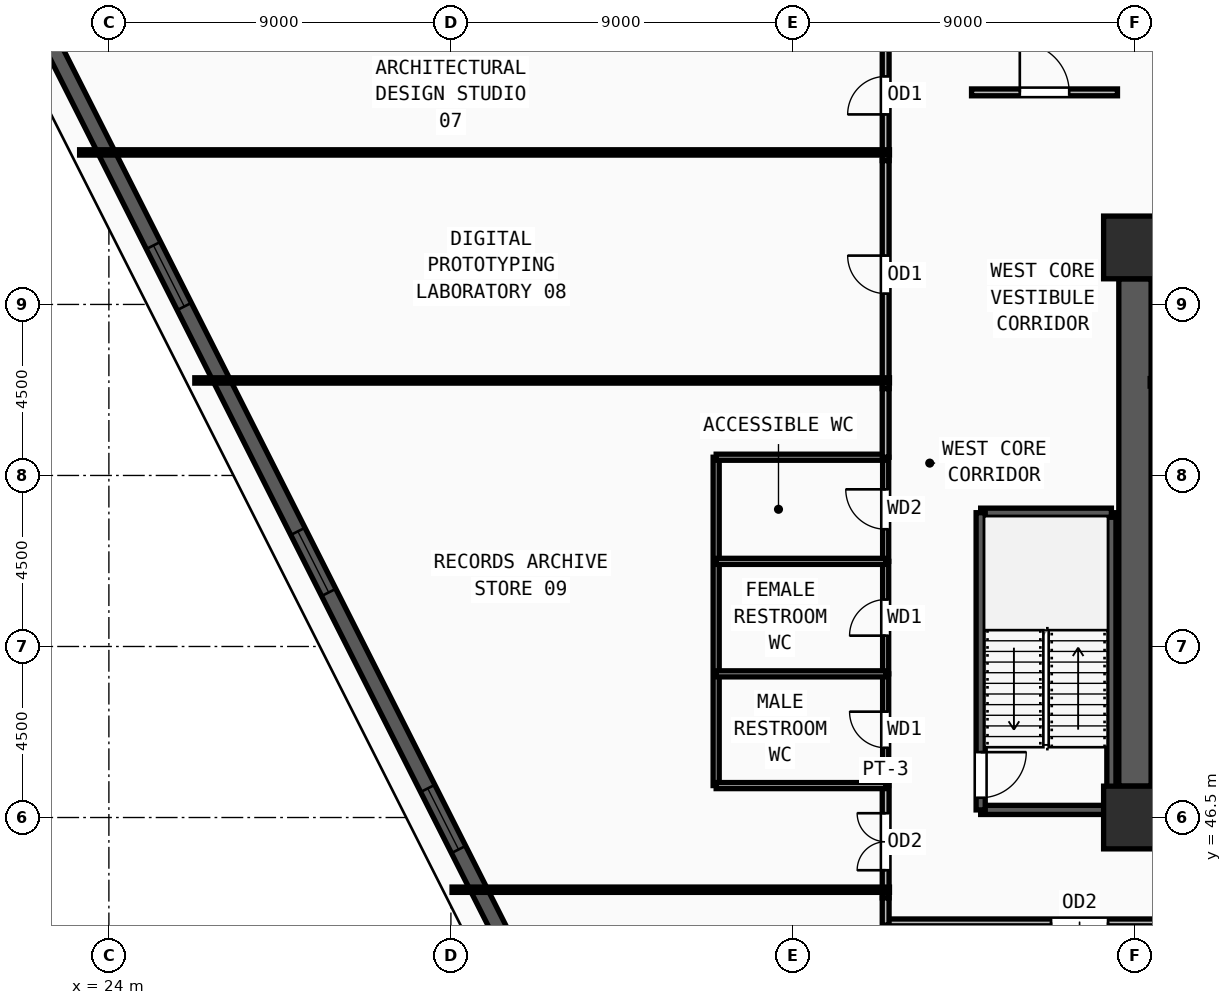
"""IFC4 building model, lengths in metres.
Left out: names, types, materials, properties, quantities, classifications, styles, units other than length and angle.
Written with IfcOpenShell. Run it as: python <this file> out.ifc"""

import sys

from ifc_helpers import new_model, si_unit, direction, frame, frame_2d, origin, origin_2d, place, context, subcontext, project, spatial, rectangle, extrude, source, transform, mapped, element, fill, save


model = new_model("IFC4")
c1 = context("Model", 3, precision=1e-05, world=origin(), true_north=direction((0.0, 1.0)))
c2 = subcontext(c1, "Body", "Model", "MODEL_VIEW")
j1 = project(units=[si_unit("LENGTHUNIT", "METRE"), si_unit("PLANEANGLEUNIT", "RADIAN")], contexts=[c1])
p1 = place(None, origin())
s1 = spatial("IfcSite", under=j1, at=p1, CompositionType="ELEMENT")
p2 = place(p1, origin())
s2 = spatial("IfcBuilding", under=s1, at=p2, CompositionType="ELEMENT")
p3 = place(p2, frame((0.0, 0.0, 51.75)))
s3 = spatial("IfcBuildingStorey", under=s2, at=p3, CompositionType="ELEMENT", Elevation=51.75)
m1 = source(origin(), c2, "Body", "SweptSolid", [
    extrude(rectangle(XDim=1.65, YDim=1.65, at=origin_2d()), origin(), (0.0, 0.0, 1.0), 3.75),
])
for number, where, z_axis, x_axis in (
    (1, (51.0, 46.5, 0.0), (0.0, 0.0, 1.0), (1.0, 0.0, 0.0)),
    (2, (51.0, 61.5, 0.0), (0.0, 0.0, 1.0), (1.0, 0.0, 0.0)),
):
    element("IfcColumn", number, at=place(p3, frame(where, z_axis=z_axis, x_axis=x_axis)), inside=s3, PredefinedType="COLUMN", context=c2, shape_type="MappedRepresentation", body=[
        mapped(m1, transform((0.0, 0.0, 0.0), x_axis=(1.0, 0.0, 0.0), y_axis=(0.0, 1.0, 0.0), z_axis=(0.0, 0.0, 1.0), scale=1.0)),
    ])
p4 = place(p3, frame((21.778, 68.272, 0.0), z_axis=(0.0, 0.0, 1.0), x_axis=(0.45088567069, -0.892581711647, 0.0)))
e3 = element("IfcWall", 3, at=p4, inside=s3, PredefinedType="SOLIDWALL", context=c2, shape_type="SweptSolid", body=[
    extrude(rectangle(XDim=33.713, YDim=0.42, at=frame_2d((16.857, 0.0))), origin(), (0.0, 0.0, 1.0), 3.57),
])
m2 = source(origin(), c2, "Body", "SweptSolid", [
    extrude(rectangle(XDim=1.8, YDim=1.95, at=frame_2d((0.9, 0.975))), frame((0.0, 0.22, 0.0), z_axis=(0.0, -1.0, 0.0), x_axis=(1.0, 0.0, 0.0)), (0.0, 0.0, 1.0), 0.44),
])
p5 = place(p4, frame((7.528, 0.0, 0.55)))
e4 = element("IfcOpeningElement", 4, at=p5, cuts=e3, PredefinedType="OPENING", context=c2, shape_type="MappedRepresentation", body=[
    mapped(m2, transform((0.0, 0.0, 0.0), x_axis=(1.0, 0.0, 0.0), y_axis=(0.0, 1.0, 0.0), z_axis=(0.0, 0.0, 1.0), scale=1.0)),
])
p6 = place(p4, frame((15.957, 0.0, 0.55)))
e5 = element("IfcOpeningElement", 5, at=p6, cuts=e3, PredefinedType="OPENING", context=c2, shape_type="MappedRepresentation", body=[
    mapped(m2, transform((0.0, 0.0, 0.0), x_axis=(1.0, 0.0, 0.0), y_axis=(0.0, 1.0, 0.0), z_axis=(0.0, 0.0, 1.0), scale=1.0)),
])
p7 = place(p4, frame((23.535, 0.0, 0.55)))
e6 = element("IfcOpeningElement", 6, at=p7, cuts=e3, PredefinedType="OPENING", context=c2, shape_type="MappedRepresentation", body=[
    mapped(m2, transform((0.0, 0.0, 0.0), x_axis=(1.0, 0.0, 0.0), y_axis=(0.0, 1.0, 0.0), z_axis=(0.0, 0.0, 1.0), scale=1.0)),
])
p8 = place(p3, frame((51.0, 47.325, 0.0), z_axis=(0.0, 0.0, 1.0), x_axis=(0.0, 1.0, 0.0)))
e7 = element("IfcWall", 7, at=p8, inside=s3, PredefinedType="SHEAR", context=c2, shape_type="SweptSolid", body=[
    extrude(rectangle(XDim=13.35, YDim=0.85, at=frame_2d((6.675, 0.0))), origin(), (0.0, 0.0, 1.0), 3.57),
])
p9 = place(p3, frame((46.94, 46.7, 0.0), z_axis=(0.0, 0.0, 1.0), x_axis=(1.0, 0.0, 0.0)))
e8 = element("IfcWall", 8, at=p9, inside=s3, PredefinedType="SOLIDWALL", context=c2, shape_type="SweptSolid", body=[
    extrude(rectangle(XDim=3.44, YDim=0.24, at=frame_2d((1.72, 0.0))), origin(), (0.0, 0.0, 1.0), 3.57),
])
p10 = place(p3, frame((50.38, 46.7, 0.0), z_axis=(0.0, 0.0, 1.0), x_axis=(0.0, 1.0, 0.0)))
e9 = element("IfcWall", 9, at=p10, inside=s3, PredefinedType="SOLIDWALL", context=c2, shape_type="SweptSolid", body=[
    extrude(rectangle(XDim=7.82, YDim=0.24, at=frame_2d((3.91, 0.0))), origin(), (0.0, 0.0, 1.0), 3.57),
])
p11 = place(p3, frame((50.38, 54.52, 0.0), z_axis=(0.0, 0.0, 1.0), x_axis=(-1.0, 0.0, 0.0)))
e10 = element("IfcWall", 10, at=p11, inside=s3, PredefinedType="SOLIDWALL", context=c2, shape_type="SweptSolid", body=[
    extrude(rectangle(XDim=3.44, YDim=0.24, at=frame_2d((1.72, 0.0))), origin(), (0.0, 0.0, 1.0), 3.57),
])
p12 = place(p3, frame((46.94, 54.52, 0.0), z_axis=(0.0, 0.0, 1.0), x_axis=(0.0, -1.0, 0.0)))
e11 = element("IfcWall", 11, at=p12, inside=s3, PredefinedType="SOLIDWALL", context=c2, shape_type="SweptSolid", body=[
    extrude(rectangle(XDim=7.82, YDim=0.24, at=frame_2d((3.91, 0.0))), origin(), (0.0, 0.0, 1.0), 3.57),
])
m3 = source(origin(), c2, "Body", "SweptSolid", [
    extrude(rectangle(XDim=1.2, YDim=2.2, at=frame_2d((0.6, 1.1))), frame((0.0, 0.13, 0.0), z_axis=(0.0, -1.0, 0.0), x_axis=(1.0, 0.0, 0.0)), (0.0, 0.0, 1.0), 0.26),
])
p13 = place(p12, frame((6.3, 0.0, 0.0)))
e12 = element("IfcOpeningElement", 12, at=p13, cuts=e11, PredefinedType="OPENING", context=c2, shape_type="MappedRepresentation", body=[
    mapped(m3, transform((0.0, 0.0, 0.0), x_axis=(1.0, 0.0, 0.0), y_axis=(0.0, 1.0, 0.0), z_axis=(0.0, 0.0, 1.0), scale=1.0)),
])
for number, where, z_axis, x_axis in (
    (13, (51.4, 57.95, 0.0), (0.0, 0.0, 1.0), (1.0, 0.0, 0.0)),
    (14, (53.8, 60.88, 0.0), (0.0, 0.0, 1.0), (-1.0, 0.0, 0.0)),
):
    element("IfcWall", number, at=place(p3, frame(where, z_axis=z_axis, x_axis=x_axis)), inside=s3, PredefinedType="SOLIDWALL", context=c2, shape_type="SweptSolid", body=[
        extrude(rectangle(XDim=2.4, YDim=0.2, at=frame_2d((1.2, 0.0))), origin(), (0.0, 0.0, 1.0), 3.57),
    ])
p14 = place(p3, frame((44.44, 47.34, 0.0), z_axis=(0.0, 0.0, 1.0), x_axis=(0.0, 1.0, 0.0)))
e15 = element("IfcWall", 15, at=p14, inside=s3, PredefinedType="PARTITIONING", context=c2, shape_type="SweptSolid", body=[
    extrude(rectangle(XDim=2.94, YDim=0.16, at=frame_2d((1.47, 0.0))), origin(), (0.0, 0.0, 1.0), 3.57),
])
m4 = source(origin(), c2, "Body", "SweptSolid", [
    extrude(rectangle(XDim=0.95, YDim=2.15, at=frame_2d((0.475, 1.075))), frame((0.0, 0.09, 0.0), z_axis=(0.0, -1.0, 0.0), x_axis=(1.0, 0.0, 0.0)), (0.0, 0.0, 1.0), 0.18),
])
p15 = place(p14, frame((0.995, 0.0, 0.0)))
e16 = element("IfcOpeningElement", 16, at=p15, cuts=e15, PredefinedType="OPENING", context=c2, shape_type="MappedRepresentation", body=[
    mapped(m4, transform((0.0, 0.0, 0.0), x_axis=(1.0, 0.0, 0.0), y_axis=(0.0, 1.0, 0.0), z_axis=(0.0, 0.0, 1.0), scale=1.0)),
])
p16 = place(p3, frame((44.44, 50.28, 0.0), z_axis=(0.0, 0.0, 1.0), x_axis=(0.0, 1.0, 0.0)))
e17 = element("IfcWall", 17, at=p16, inside=s3, PredefinedType="PARTITIONING", context=c2, shape_type="SweptSolid", body=[
    extrude(rectangle(XDim=2.96, YDim=0.16, at=frame_2d((1.48, 0.0))), origin(), (0.0, 0.0, 1.0), 3.57),
])
p17 = place(p16, frame((1.005, 0.0, 0.0)))
e18 = element("IfcOpeningElement", 18, at=p17, cuts=e17, PredefinedType="OPENING", context=c2, shape_type="MappedRepresentation", body=[
    mapped(m4, transform((0.0, 0.0, 0.0), x_axis=(1.0, 0.0, 0.0), y_axis=(0.0, 1.0, 0.0), z_axis=(0.0, 0.0, 1.0), scale=1.0)),
])
p18 = place(p3, frame((44.44, 53.24, 0.0), z_axis=(0.0, 0.0, 1.0), x_axis=(0.0, 1.0, 0.0)))
e19 = element("IfcWall", 19, at=p18, inside=s3, PredefinedType="PARTITIONING", context=c2, shape_type="SweptSolid", body=[
    extrude(rectangle(XDim=2.74, YDim=0.16, at=frame_2d((1.37, 0.0))), origin(), (0.0, 0.0, 1.0), 3.57),
])
m5 = source(origin(), c2, "Body", "SweptSolid", [
    extrude(rectangle(XDim=1.05, YDim=2.15, at=frame_2d((0.525, 1.075))), frame((0.0, 0.09, 0.0), z_axis=(0.0, -1.0, 0.0), x_axis=(1.0, 0.0, 0.0)), (0.0, 0.0, 1.0), 0.18),
])
p19 = place(p18, frame((0.845, 0.0, 0.0)))
e20 = element("IfcOpeningElement", 20, at=p19, cuts=e19, PredefinedType="OPENING", context=c2, shape_type="MappedRepresentation", body=[
    mapped(m5, transform((0.0, 0.0, 0.0), x_axis=(1.0, 0.0, 0.0), y_axis=(0.0, 1.0, 0.0), z_axis=(0.0, 0.0, 1.0), scale=1.0)),
])
p20 = place(p3, frame((46.7, 65.58, 0.0), z_axis=(0.0, 0.0, 1.0), x_axis=(1.0, 0.0, 0.0)))
e21 = element("IfcWall", 21, at=p20, inside=s3, PredefinedType="PARTITIONING", context=c2, shape_type="SweptSolid", body=[
    extrude(rectangle(XDim=3.84, YDim=0.18, at=frame_2d((1.92, 0.0))), origin(), (0.0, 0.0, 1.0), 3.57),
])
m6 = source(origin(), c2, "Body", "SweptSolid", [
    extrude(rectangle(XDim=1.3, YDim=2.2, at=frame_2d((0.65, 1.1))), frame((0.0, 0.1, 0.0), z_axis=(0.0, -1.0, 0.0), x_axis=(1.0, 0.0, 0.0)), (0.0, 0.0, 1.0), 0.2),
])
p21 = place(p20, frame((1.27, 0.0, 0.0)))
e22 = element("IfcOpeningElement", 22, at=p21, cuts=e21, PredefinedType="OPENING", context=c2, shape_type="MappedRepresentation", body=[
    mapped(m6, transform((0.0, 0.0, 0.0), x_axis=(1.0, 0.0, 0.0), y_axis=(0.0, 1.0, 0.0), z_axis=(0.0, 0.0, 1.0), scale=1.0)),
])
p22 = place(p3, frame((44.44, 63.785, 0.0), z_axis=(0.0, 0.0, 1.0), x_axis=(0.0, 1.0, 0.0)))
e23 = element("IfcWall", 23, at=p22, inside=s3, PredefinedType="PARTITIONING", context=c2, shape_type="SweptSolid", body=[
    extrude(rectangle(XDim=3.43, YDim=0.18, at=frame_2d((1.715, 0.0))), origin(), (0.0, 0.0, 1.0), 3.57),
])
m7 = source(origin(), c2, "Body", "SweptSolid", [
    extrude(rectangle(XDim=1.0, YDim=2.2, at=frame_2d((0.5, 1.1))), frame((0.0, 0.1, 0.0), z_axis=(0.0, -1.0, 0.0), x_axis=(1.0, 0.0, 0.0)), (0.0, 0.0, 1.0), 0.2),
])
p23 = place(p22, frame((1.215, 0.0, 0.0)))
e24 = element("IfcOpeningElement", 24, at=p23, cuts=e23, PredefinedType="OPENING", context=c2, shape_type="MappedRepresentation", body=[
    mapped(m7, transform((0.0, 0.0, 0.0), x_axis=(1.0, 0.0, 0.0), y_axis=(0.0, 1.0, 0.0), z_axis=(0.0, 0.0, 1.0), scale=1.0)),
])
p24 = place(p3, frame((44.44, 57.785, 0.0), z_axis=(0.0, 0.0, 1.0), x_axis=(0.0, 1.0, 0.0)))
e25 = element("IfcWall", 25, at=p24, inside=s3, PredefinedType="PARTITIONING", context=c2, shape_type="SweptSolid", body=[
    extrude(rectangle(XDim=6.0, YDim=0.18, at=frame_2d((3.0, 0.0))), origin(), (0.0, 0.0, 1.0), 3.57),
])
p25 = place(p24, frame((2.5, 0.0, 0.0)))
e26 = element("IfcOpeningElement", 26, at=p25, cuts=e25, PredefinedType="OPENING", context=c2, shape_type="MappedRepresentation", body=[
    mapped(m7, transform((0.0, 0.0, 0.0), x_axis=(1.0, 0.0, 0.0), y_axis=(0.0, 1.0, 0.0), z_axis=(0.0, 0.0, 1.0), scale=1.0)),
])
p26 = place(p3, frame((44.44, 44.385, 0.0), z_axis=(0.0, 0.0, 1.0), x_axis=(0.0, 1.0, 0.0)))
e27 = element("IfcWall", 27, at=p26, inside=s3, PredefinedType="PARTITIONING", context=c2, shape_type="SweptSolid", body=[
    extrude(rectangle(XDim=2.955, YDim=0.18, at=frame_2d((1.478, 0.0))), origin(), (0.0, 0.0, 1.0), 3.57),
])
m8 = source(origin(), c2, "Body", "SweptSolid", [
    extrude(rectangle(XDim=1.5, YDim=2.2, at=frame_2d((0.75, 1.1))), frame((0.0, 0.1, 0.0), z_axis=(0.0, -1.0, 0.0), x_axis=(1.0, 0.0, 0.0)), (0.0, 0.0, 1.0), 0.2),
])
p27 = place(p26, frame((0.728, 0.0, 0.0)))
e28 = element("IfcOpeningElement", 28, at=p27, cuts=e27, PredefinedType="OPENING", context=c2, shape_type="MappedRepresentation", body=[
    mapped(m8, transform((0.0, 0.0, 0.0), x_axis=(1.0, 0.0, 0.0), y_axis=(0.0, 1.0, 0.0), z_axis=(0.0, 0.0, 1.0), scale=1.0)),
])
p28 = place(p3, frame((54.715, 43.74, 0.0), z_axis=(0.0, 0.0, 1.0), x_axis=(-1.0, 0.0, 0.0)))
e29 = element("IfcWall", 29, at=p28, inside=s3, PredefinedType="PARTITIONING", context=c2, shape_type="SweptSolid", body=[
    extrude(rectangle(XDim=10.345, YDim=0.18, at=frame_2d((5.172, 0.0))), origin(), (0.0, 0.0, 1.0), 3.57),
])
p29 = place(p28, frame((4.423, 0.0, 0.0)))
e30 = element("IfcOpeningElement", 30, at=p29, cuts=e29, PredefinedType="OPENING", context=c2, shape_type="MappedRepresentation", body=[
    mapped(m8, transform((0.0, 0.0, 0.0), x_axis=(1.0, 0.0, 0.0), y_axis=(0.0, 1.0, 0.0), z_axis=(0.0, 0.0, 1.0), scale=1.0)),
])
p30 = place(p3, frame((39.98, 47.34, 0.0), z_axis=(0.0, 0.0, 1.0), x_axis=(0.0, 1.0, 0.0)))
e31 = element("IfcWall", 31, at=p30, inside=s3, PredefinedType="PARTITIONING", context=c2, shape_type="SweptSolid", body=[
    extrude(rectangle(XDim=8.64, YDim=0.16, at=frame_2d((4.32, 0.0))), origin(), (0.0, 0.0, 1.0), 3.57),
])
for number, where, z_axis, x_axis in (
    (32, (39.98, 47.34, 0.0), (0.0, 0.0, 1.0), (1.0, 0.0, 0.0)),
    (33, (39.98, 50.28, 0.0), (0.0, 0.0, 1.0), (1.0, 0.0, 0.0)),
    (34, (39.98, 53.24, 0.0), (0.0, 0.0, 1.0), (1.0, 0.0, 0.0)),
    (35, (39.98, 55.98, 0.0), (0.0, 0.0, 1.0), (1.0, 0.0, 0.0)),
):
    element("IfcWall", number, at=place(p3, frame(where, z_axis=z_axis, x_axis=x_axis)), inside=s3, PredefinedType="PARTITIONING", context=c2, shape_type="SweptSolid", body=[
        extrude(rectangle(XDim=4.46, YDim=0.16, at=frame_2d((2.23, 0.0))), origin(), (0.0, 0.0, 1.0), 3.57),
    ])
p31 = place(p3, frame((44.44, 55.98, 0.0), z_axis=(0.0, 0.0, 1.0), x_axis=(0.0, 1.0, 0.0)))
e36 = element("IfcWall", 36, at=p31, inside=s3, PredefinedType="PARTITIONING", context=c2, shape_type="SweptSolid", body=[
    extrude(rectangle(XDim=1.805, YDim=0.18, at=frame_2d((0.902, 0.0))), origin(), (0.0, 0.0, 1.0), 3.57),
])
p32 = place(p3, frame((44.44, 43.67, 0.0), z_axis=(0.0, 0.0, 1.0), x_axis=(0.0, 1.0, 0.0)))
e37 = element("IfcWall", 37, at=p32, inside=s3, PredefinedType="PARTITIONING", context=c2, shape_type="SweptSolid", body=[
    extrude(rectangle(XDim=0.715, YDim=0.18, at=frame_2d((0.357, 0.0))), origin(), (0.0, 0.0, 1.0), 3.57),
])
p33 = place(p3, frame((44.54, 44.6, 0.0), z_axis=(0.0, 0.0, 1.0), x_axis=(-1.0, 0.0, 0.0)))
e38 = element("IfcWall", 38, at=p33, inside=s3, PredefinedType="PARTITIONING", context=c2, shape_type="SweptSolid", body=[
    extrude(rectangle(XDim=11.51, YDim=0.14, at=frame_2d((5.755, 0.0))), origin(), (0.0, 0.0, 1.0), 3.57),
])
p34 = place(p3, frame((44.54, 58.0, 0.0), z_axis=(0.0, 0.0, 1.0), x_axis=(-1.0, 0.0, 0.0)))
e39 = element("IfcWall", 39, at=p34, inside=s3, PredefinedType="PARTITIONING", context=c2, shape_type="SweptSolid", body=[
    extrude(rectangle(XDim=18.279, YDim=0.14, at=frame_2d((9.14, 0.0))), origin(), (0.0, 0.0, 1.0), 3.57),
])
p35 = place(p3, frame((44.54, 64.0, 0.0), z_axis=(0.0, 0.0, 1.0), x_axis=(-1.0, 0.0, 0.0)))
e40 = element("IfcWall", 40, at=p35, inside=s3, PredefinedType="PARTITIONING", context=c2, shape_type="SweptSolid", body=[
    extrude(rectangle(XDim=21.31, YDim=0.14, at=frame_2d((10.655, 0.0))), origin(), (0.0, 0.0, 1.0), 2.655),
])
m9 = source(origin(), c2, "Body", "SweptSolid", [
    extrude(rectangle(XDim=1.8, YDim=1.95, at=frame_2d((0.9, 0.975))), frame((0.0, 0.03, 0.0), z_axis=(0.0, -1.0, 0.0), x_axis=(1.0, 0.0, 0.0)), (0.0, 0.0, 1.0), 0.06),
])
p36 = place(p5, origin())
e41 = element("IfcWindow", 41, at=p36, inside=s3, PartitioningType="DOUBLE_PANEL_VERTICAL", PredefinedType="WINDOW", context=c2, shape_type="MappedRepresentation", body=[
    mapped(m9, transform((0.0, 0.0, 0.0), x_axis=(1.0, 0.0, 0.0), y_axis=(0.0, 1.0, 0.0), z_axis=(0.0, 0.0, 1.0), scale=1.0)),
])
fill(e4, e41)
p37 = place(p6, origin())
e42 = element("IfcWindow", 42, at=p37, inside=s3, PartitioningType="DOUBLE_PANEL_VERTICAL", PredefinedType="WINDOW", context=c2, shape_type="MappedRepresentation", body=[
    mapped(m9, transform((0.0, 0.0, 0.0), x_axis=(1.0, 0.0, 0.0), y_axis=(0.0, 1.0, 0.0), z_axis=(0.0, 0.0, 1.0), scale=1.0)),
])
fill(e5, e42)
p38 = place(p7, origin())
e43 = element("IfcWindow", 43, at=p38, inside=s3, PartitioningType="DOUBLE_PANEL_VERTICAL", PredefinedType="WINDOW", context=c2, shape_type="MappedRepresentation", body=[
    mapped(m9, transform((0.0, 0.0, 0.0), x_axis=(1.0, 0.0, 0.0), y_axis=(0.0, 1.0, 0.0), z_axis=(0.0, 0.0, 1.0), scale=1.0)),
])
fill(e6, e43)
m10 = source(origin(), c2, "Body", "SweptSolid", [
    extrude(rectangle(XDim=1.2, YDim=2.2, at=frame_2d((0.6, 1.1))), frame((0.0, 0.025, 0.0), z_axis=(0.0, -1.0, 0.0), x_axis=(1.0, 0.0, 0.0)), (0.0, 0.0, 1.0), 0.05),
])
p39 = place(p13, origin())
e44 = element("IfcDoor", 44, at=p39, inside=s3, OperationType="SINGLE_SWING_LEFT", PredefinedType="DOOR", context=c2, shape_type="MappedRepresentation", body=[
    mapped(m10, transform((0.0, 0.0, 0.0), x_axis=(1.0, 0.0, 0.0), y_axis=(0.0, 1.0, 0.0), z_axis=(0.0, 0.0, 1.0), scale=1.0)),
])
fill(e12, e44)
m11 = source(origin(), c2, "Body", "SweptSolid", [
    extrude(rectangle(XDim=0.95, YDim=2.15, at=frame_2d((0.475, 1.075))), frame((0.0, 0.025, 0.0), z_axis=(0.0, -1.0, 0.0), x_axis=(1.0, 0.0, 0.0)), (0.0, 0.0, 1.0), 0.05),
])
p40 = place(p15, origin())
e45 = element("IfcDoor", 45, at=p40, inside=s3, OperationType="SINGLE_SWING_RIGHT", PredefinedType="DOOR", context=c2, shape_type="MappedRepresentation", body=[
    mapped(m11, transform((0.0, 0.0, 0.0), x_axis=(1.0, 0.0, 0.0), y_axis=(0.0, 1.0, 0.0), z_axis=(0.0, 0.0, 1.0), scale=1.0)),
])
fill(e16, e45)
p41 = place(p17, origin())
e46 = element("IfcDoor", 46, at=p41, inside=s3, OperationType="SINGLE_SWING_LEFT", PredefinedType="DOOR", context=c2, shape_type="MappedRepresentation", body=[
    mapped(m11, transform((0.0, 0.0, 0.0), x_axis=(1.0, 0.0, 0.0), y_axis=(0.0, 1.0, 0.0), z_axis=(0.0, 0.0, 1.0), scale=1.0)),
])
fill(e18, e46)
m12 = source(origin(), c2, "Body", "SweptSolid", [
    extrude(rectangle(XDim=1.05, YDim=2.15, at=frame_2d((0.525, 1.075))), frame((0.0, 0.025, 0.0), z_axis=(0.0, -1.0, 0.0), x_axis=(1.0, 0.0, 0.0)), (0.0, 0.0, 1.0), 0.05),
])
p42 = place(p19, origin())
e47 = element("IfcDoor", 47, at=p42, inside=s3, OperationType="SINGLE_SWING_RIGHT", PredefinedType="DOOR", context=c2, shape_type="MappedRepresentation", body=[
    mapped(m12, transform((0.0, 0.0, 0.0), x_axis=(1.0, 0.0, 0.0), y_axis=(0.0, 1.0, 0.0), z_axis=(0.0, 0.0, 1.0), scale=1.0)),
])
fill(e20, e47)
m13 = source(origin(), c2, "Body", "SweptSolid", [
    extrude(rectangle(XDim=1.3, YDim=2.2, at=frame_2d((0.65, 1.1))), frame((0.0, 0.025, 0.0), z_axis=(0.0, -1.0, 0.0), x_axis=(1.0, 0.0, 0.0)), (0.0, 0.0, 1.0), 0.05),
])
p43 = place(p21, origin())
e48 = element("IfcDoor", 48, at=p43, inside=s3, OperationType="SINGLE_SWING_LEFT", PredefinedType="DOOR", context=c2, shape_type="MappedRepresentation", body=[
    mapped(m13, transform((0.0, 0.0, 0.0), x_axis=(1.0, 0.0, 0.0), y_axis=(0.0, 1.0, 0.0), z_axis=(0.0, 0.0, 1.0), scale=1.0)),
])
fill(e22, e48)
m14 = source(origin(), c2, "Body", "SweptSolid", [
    extrude(rectangle(XDim=1.0, YDim=2.2, at=frame_2d((0.5, 1.1))), frame((0.0, 0.025, 0.0), z_axis=(0.0, -1.0, 0.0), x_axis=(1.0, 0.0, 0.0)), (0.0, 0.0, 1.0), 0.05),
])
p44 = place(p23, origin())
e49 = element("IfcDoor", 49, at=p44, inside=s3, OperationType="SINGLE_SWING_LEFT", PredefinedType="DOOR", context=c2, shape_type="MappedRepresentation", body=[
    mapped(m14, transform((0.0, 0.0, 0.0), x_axis=(1.0, 0.0, 0.0), y_axis=(0.0, 1.0, 0.0), z_axis=(0.0, 0.0, 1.0), scale=1.0)),
])
fill(e24, e49)
p45 = place(p25, origin())
e50 = element("IfcDoor", 50, at=p45, inside=s3, OperationType="SINGLE_SWING_RIGHT", PredefinedType="DOOR", context=c2, shape_type="MappedRepresentation", body=[
    mapped(m14, transform((0.0, 0.0, 0.0), x_axis=(1.0, 0.0, 0.0), y_axis=(0.0, 1.0, 0.0), z_axis=(0.0, 0.0, 1.0), scale=1.0)),
])
fill(e26, e50)
m15 = source(origin(), c2, "Body", "SweptSolid", [
    extrude(rectangle(XDim=1.5, YDim=2.2, at=frame_2d((0.75, 1.1))), frame((0.0, 0.025, 0.0), z_axis=(0.0, -1.0, 0.0), x_axis=(1.0, 0.0, 0.0)), (0.0, 0.0, 1.0), 0.05),
])
p46 = place(p27, origin())
e51 = element("IfcDoor", 51, at=p46, inside=s3, OperationType="DOUBLE_DOOR_SINGLE_SWING", PredefinedType="DOOR", context=c2, shape_type="MappedRepresentation", body=[
    mapped(m15, transform((0.0, 0.0, 0.0), x_axis=(1.0, 0.0, 0.0), y_axis=(0.0, 1.0, 0.0), z_axis=(0.0, 0.0, 1.0), scale=1.0)),
])
fill(e28, e51)
p47 = place(p29, origin())
e52 = element("IfcDoor", 52, at=p47, inside=s3, OperationType="DOUBLE_DOOR_SINGLE_SWING", PredefinedType="DOOR", context=c2, shape_type="MappedRepresentation", body=[
    mapped(m15, transform((0.0, 0.0, 0.0), x_axis=(1.0, 0.0, 0.0), y_axis=(0.0, 1.0, 0.0), z_axis=(0.0, 0.0, 1.0), scale=1.0)),
])
fill(e30, e52)
save(model, sys.argv[1])
